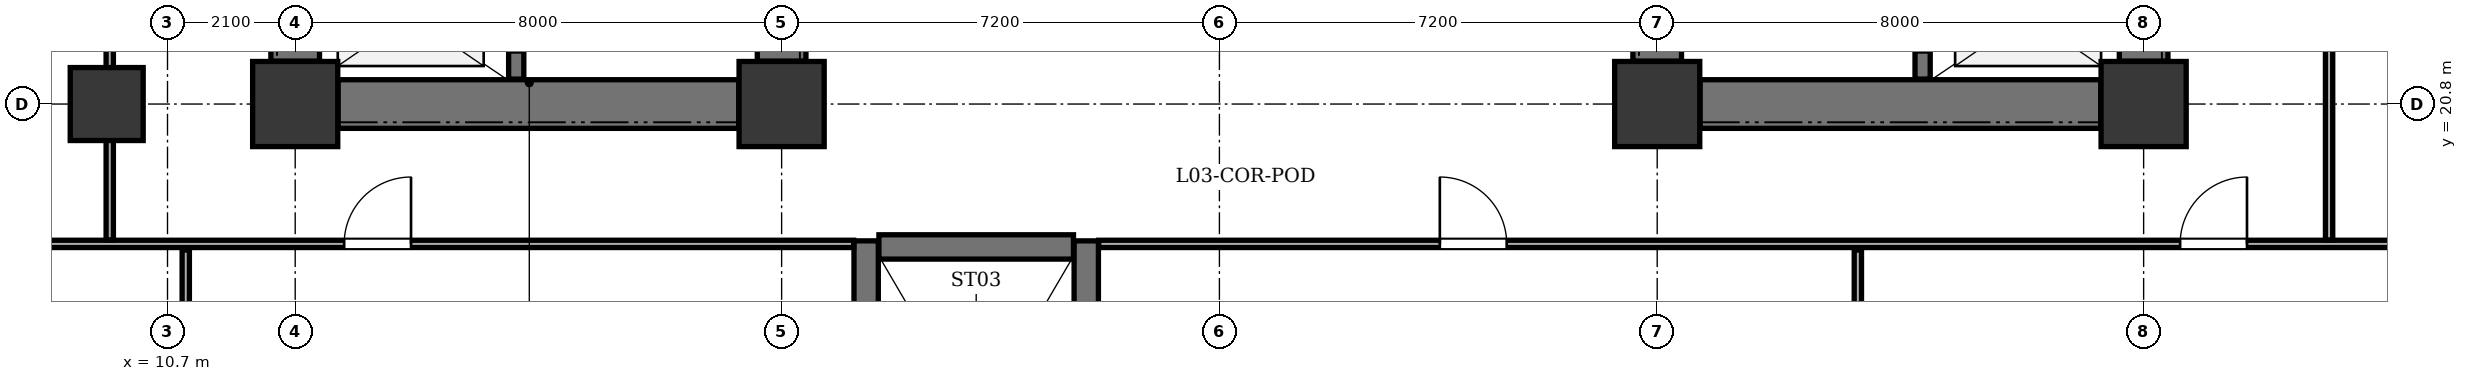
"""IFC4 building model, lengths in metres.
Left out: names, types, materials, properties, quantities, classifications, styles, units other than length and angle.
Written with IfcOpenShell. Run it as: python <this file> out.ifc"""

import sys

from ifc_helpers import new_model, si_unit, direction, frame, frame_2d, origin, origin_2d, place, context, subcontext, project, spatial, rectangle, extrude, element, fill, save


model = new_model("IFC4")
c1 = context("Model", 3, precision=1e-05, world=origin(), true_north=direction((0.0, 1.0)))
c2 = subcontext(c1, "Body", "Model", "MODEL_VIEW")
j1 = project(units=[si_unit("LENGTHUNIT", "METRE"), si_unit("PLANEANGLEUNIT", "RADIAN")], contexts=[c1])
p1 = place(None, origin())
s1 = spatial("IfcSite", under=j1, at=p1, CompositionType="ELEMENT")
p2 = place(p1, origin())
s2 = spatial("IfcBuilding", under=s1, at=p2, CompositionType="ELEMENT")
p3 = place(p2, frame((0.0, 0.0, 14.4)))
s3 = spatial("IfcBuildingStorey", under=s2, at=p3, CompositionType="ELEMENT", Elevation=14.4)
for number, where, z_axis, x_axis in (
    (1, (12.8, 20.8, 0.0), (0.0, 0.0, 1.0), (1.0, 0.0, 0.0)),
    (2, (20.8, 20.8, 0.0), (0.0, 0.0, 1.0), (1.0, 0.0, 0.0)),
    (3, (35.2, 20.8, 0.0), (0.0, 0.0, 1.0), (1.0, 0.0, 0.0)),
    (4, (43.2, 20.8, 0.0), (0.0, 0.0, 1.0), (1.0, 0.0, 0.0)),
):
    element("IfcColumn", number, at=place(p3, frame(where, z_axis=z_axis, x_axis=x_axis)), inside=s3, PredefinedType="COLUMN", context=c2, shape_type="SweptSolid", body=[
        extrude(rectangle(XDim=1.4, YDim=1.4, at=origin_2d()), origin(), (0.0, 0.0, 1.0), 4.5),
    ])
p4 = place(p3, frame((9.7, 20.8, 0.0), z_axis=(0.0, 0.0, 1.0), x_axis=(1.0, 0.0, 0.0)))
e5 = element("IfcColumn", 5, at=p4, inside=s3, PredefinedType="COLUMN", context=c2, shape_type="SweptSolid", body=[
    extrude(rectangle(XDim=1.2, YDim=1.2, at=origin_2d()), origin(), (0.0, 0.0, 1.0), 4.5),
])
p5 = place(p3, frame((12.8, 21.505, 0.0), z_axis=(0.0, 0.0, 1.0), x_axis=(0.0, 1.0, 0.0)))
e6 = element("IfcWall", 6, at=p5, inside=s3, PredefinedType="SHEAR", context=c2, shape_type="SweptSolid", body=[
    extrude(rectangle(XDim=11.39, YDim=0.8, at=frame_2d((5.695, 0.0))), origin(), (0.0, 0.0, 1.0), 4.0),
])
p6 = place(p3, frame((13.505, 20.8, 0.0), z_axis=(0.0, 0.0, 1.0), x_axis=(1.0, 0.0, 0.0)))
e7 = element("IfcWall", 7, at=p6, inside=s3, PredefinedType="SHEAR", context=c2, shape_type="SweptSolid", body=[
    extrude(rectangle(XDim=6.59, YDim=0.8, at=frame_2d((3.295, 0.0))), origin(), (0.0, 0.0, 1.0), 4.0),
])
p7 = place(p3, frame((20.8, 21.505, 0.0), z_axis=(0.0, 0.0, 1.0), x_axis=(0.0, 1.0, 0.0)))
e8 = element("IfcWall", 8, at=p7, inside=s3, PredefinedType="SHEAR", context=c2, shape_type="SweptSolid", body=[
    extrude(rectangle(XDim=11.39, YDim=0.8, at=frame_2d((5.695, 0.0))), origin(), (0.0, 0.0, 1.0), 4.0),
])
p8 = place(p7, frame((1.095, 0.0, 0.0)))
e9 = element("IfcOpeningElement", 9, at=p8, cuts=e8, PredefinedType="OPENING", context=c2, shape_type="SweptSolid", body=[
    extrude(rectangle(XDim=1.2, YDim=2.15, at=frame_2d((0.6, 1.075))), frame((0.0, 0.41, 0.0), z_axis=(0.0, -1.0, 0.0), x_axis=(1.0, 0.0, 0.0)), (0.0, 0.0, 1.0), 0.82),
])
p9 = place(p7, frame((4.095, 0.0, 0.0)))
e10 = element("IfcOpeningElement", 10, at=p9, cuts=e8, PredefinedType="OPENING", context=c2, shape_type="SweptSolid", body=[
    extrude(rectangle(XDim=1.1, YDim=2.1, at=frame_2d((0.55, 1.05))), frame((0.0, 0.41, 0.0), z_axis=(0.0, -1.0, 0.0), x_axis=(1.0, 0.0, 0.0)), (0.0, 0.0, 1.0), 0.82),
])
p10 = place(p7, frame((6.045, 0.0, 0.0)))
e11 = element("IfcOpeningElement", 11, at=p10, cuts=e8, PredefinedType="OPENING", context=c2, shape_type="SweptSolid", body=[
    extrude(rectangle(XDim=1.1, YDim=2.1, at=frame_2d((0.55, 1.05))), frame((0.0, 0.41, 0.0), z_axis=(0.0, -1.0, 0.0), x_axis=(1.0, 0.0, 0.0)), (0.0, 0.0, 1.0), 0.82),
])
p11 = place(p7, frame((7.995, 0.0, 0.0)))
e12 = element("IfcOpeningElement", 12, at=p11, cuts=e8, PredefinedType="OPENING", context=c2, shape_type="SweptSolid", body=[
    extrude(rectangle(XDim=1.1, YDim=2.1, at=frame_2d((0.55, 1.05))), frame((0.0, 0.41, 0.0), z_axis=(0.0, -1.0, 0.0), x_axis=(1.0, 0.0, 0.0)), (0.0, 0.0, 1.0), 0.82),
])
p12 = place(p7, frame((10.195, 0.0, 0.0)))
e13 = element("IfcOpeningElement", 13, at=p12, cuts=e8, PredefinedType="OPENING", context=c2, shape_type="SweptSolid", body=[
    extrude(rectangle(XDim=1.1, YDim=2.1, at=frame_2d((0.55, 1.05))), frame((0.0, 0.41, 0.0), z_axis=(0.0, -1.0, 0.0), x_axis=(1.0, 0.0, 0.0)), (0.0, 0.0, 1.0), 0.82),
])
p13 = place(p3, frame((16.435, 21.21, 0.0), z_axis=(0.0, 0.0, 1.0), x_axis=(0.0, 1.0, 0.0)))
e14 = element("IfcWall", 14, at=p13, inside=s3, PredefinedType="SHEAR", context=c2, shape_type="SweptSolid", body=[
    extrude(rectangle(XDim=11.98, YDim=0.25, at=frame_2d((5.99, 0.0))), origin(), (0.0, 0.0, 1.0), 4.0),
])
p14 = place(p13, frame((0.44, 0.0, 0.0)))
e15 = element("IfcOpeningElement", 15, at=p14, cuts=e14, PredefinedType="OPENING", context=c2, shape_type="SweptSolid", body=[
    extrude(rectangle(XDim=1.2, YDim=2.15, at=frame_2d((0.6, 1.075))), frame((0.0, 0.135, 0.0), z_axis=(0.0, -1.0, 0.0), x_axis=(1.0, 0.0, 0.0)), (0.0, 0.0, 1.0), 0.27),
])
p15 = place(p13, frame((2.59, 0.0, 0.0)))
e16 = element("IfcOpeningElement", 16, at=p15, cuts=e14, PredefinedType="OPENING", context=c2, shape_type="SweptSolid", body=[
    extrude(rectangle(XDim=1.15, YDim=2.15, at=frame_2d((0.575, 1.075))), frame((0.0, 0.135, 0.0), z_axis=(0.0, -1.0, 0.0), x_axis=(1.0, 0.0, 0.0)), (0.0, 0.0, 1.0), 0.27),
])
p16 = place(p3, frame((43.2, 21.505, 0.0), z_axis=(0.0, 0.0, 1.0), x_axis=(0.0, 1.0, 0.0)))
e17 = element("IfcWall", 17, at=p16, inside=s3, PredefinedType="SHEAR", context=c2, shape_type="SweptSolid", body=[
    extrude(rectangle(XDim=11.39, YDim=0.8, at=frame_2d((5.695, 0.0))), origin(), (0.0, 0.0, 1.0), 4.0),
])
p17 = place(p3, frame((35.905, 20.8, 0.0), z_axis=(0.0, 0.0, 1.0), x_axis=(1.0, 0.0, 0.0)))
e18 = element("IfcWall", 18, at=p17, inside=s3, PredefinedType="SHEAR", context=c2, shape_type="SweptSolid", body=[
    extrude(rectangle(XDim=6.59, YDim=0.8, at=frame_2d((3.295, 0.0))), origin(), (0.0, 0.0, 1.0), 4.0),
])
p18 = place(p3, frame((35.2, 21.505, 0.0), z_axis=(0.0, 0.0, 1.0), x_axis=(0.0, 1.0, 0.0)))
e19 = element("IfcWall", 19, at=p18, inside=s3, PredefinedType="SHEAR", context=c2, shape_type="SweptSolid", body=[
    extrude(rectangle(XDim=11.39, YDim=0.8, at=frame_2d((5.695, 0.0))), origin(), (0.0, 0.0, 1.0), 4.0),
])
p19 = place(p18, frame((1.095, 0.0, 0.0)))
e20 = element("IfcOpeningElement", 20, at=p19, cuts=e19, PredefinedType="OPENING", context=c2, shape_type="SweptSolid", body=[
    extrude(rectangle(XDim=1.2, YDim=2.15, at=frame_2d((0.6, 1.075))), frame((0.0, 0.41, 0.0), z_axis=(0.0, -1.0, 0.0), x_axis=(1.0, 0.0, 0.0)), (0.0, 0.0, 1.0), 0.82),
])
p20 = place(p18, frame((10.195, 0.0, 0.0)))
e21 = element("IfcOpeningElement", 21, at=p20, cuts=e19, PredefinedType="OPENING", context=c2, shape_type="SweptSolid", body=[
    extrude(rectangle(XDim=1.1, YDim=2.1, at=frame_2d((0.55, 1.05))), frame((0.0, 0.41, 0.0), z_axis=(0.0, -1.0, 0.0), x_axis=(1.0, 0.0, 0.0)), (0.0, 0.0, 1.0), 0.82),
])
p21 = place(p3, frame((39.565, 21.21, 0.0), z_axis=(0.0, 0.0, 1.0), x_axis=(0.0, 1.0, 0.0)))
e22 = element("IfcWall", 22, at=p21, inside=s3, PredefinedType="SHEAR", context=c2, shape_type="SweptSolid", body=[
    extrude(rectangle(XDim=11.98, YDim=0.25, at=frame_2d((5.99, 0.0))), origin(), (0.0, 0.0, 1.0), 4.0),
])
p22 = place(p21, frame((0.44, 0.0, 0.0)))
e23 = element("IfcOpeningElement", 23, at=p22, cuts=e22, PredefinedType="OPENING", context=c2, shape_type="SweptSolid", body=[
    extrude(rectangle(XDim=1.2, YDim=2.15, at=frame_2d((0.6, 1.075))), frame((0.0, 0.135, 0.0), z_axis=(0.0, -1.0, 0.0), x_axis=(1.0, 0.0, 0.0)), (0.0, 0.0, 1.0), 0.27),
])
p23 = place(p21, frame((2.59, 0.0, 0.0)))
e24 = element("IfcOpeningElement", 24, at=p23, cuts=e22, PredefinedType="OPENING", context=c2, shape_type="SweptSolid", body=[
    extrude(rectangle(XDim=1.15, YDim=2.15, at=frame_2d((0.575, 1.075))), frame((0.0, 0.135, 0.0), z_axis=(0.0, -1.0, 0.0), x_axis=(1.0, 0.0, 0.0)), (0.0, 0.0, 1.0), 0.27),
])
p24 = place(p3, frame((22.19, 10.95, 0.0), z_axis=(0.0, 0.0, 1.0), x_axis=(0.0, 1.0, 0.0)))
e25 = element("IfcWall", 25, at=p24, inside=s3, PredefinedType="SHEAR", context=c2, shape_type="SweptSolid", body=[
    extrude(rectangle(XDim=7.6, YDim=0.4, at=frame_2d((3.8, 0.0))), origin(), (0.0, 0.0, 1.0), 4.0),
])
p25 = place(p24, frame((0.35, 0.0, 0.0)))
e26 = element("IfcOpeningElement", 26, at=p25, cuts=e25, PredefinedType="OPENING", context=c2, shape_type="SweptSolid", body=[
    extrude(rectangle(XDim=1.15, YDim=2.15, at=frame_2d((0.575, 1.075))), frame((0.0, 0.21, 0.0), z_axis=(0.0, -1.0, 0.0), x_axis=(1.0, 0.0, 0.0)), (0.0, 0.0, 1.0), 0.42),
])
p26 = place(p3, frame((25.81, 10.95, 0.0), z_axis=(0.0, 0.0, 1.0), x_axis=(0.0, 1.0, 0.0)))
e27 = element("IfcWall", 27, at=p26, inside=s3, PredefinedType="SHEAR", context=c2, shape_type="SweptSolid", body=[
    extrude(rectangle(XDim=7.6, YDim=0.4, at=frame_2d((3.8, 0.0))), origin(), (0.0, 0.0, 1.0), 4.0),
])
p27 = place(p3, frame((22.4, 18.45, 0.0), z_axis=(0.0, 0.0, 1.0), x_axis=(1.0, 0.0, 0.0)))
e28 = element("IfcWall", 28, at=p27, inside=s3, PredefinedType="SHEAR", context=c2, shape_type="SweptSolid", body=[
    extrude(rectangle(XDim=3.2, YDim=0.4, at=frame_2d((1.6, 0.0))), origin(), (0.0, 0.0, 1.0), 4.0),
])
p28 = place(p3, frame((2.805, 18.5, 0.0), z_axis=(0.0, 0.0, 1.0), x_axis=(1.0, 0.0, 0.0)))
e29 = element("IfcWall", 29, at=p28, inside=s3, PredefinedType="PARTITIONING", context=c2, shape_type="SweptSolid", body=[
    extrude(rectangle(XDim=19.18, YDim=0.12, at=frame_2d((9.59, 0.0))), origin(), (0.0, 0.0, 1.0), 3.435),
])
p29 = place(p28, frame((4.0, 0.0, 0.0)))
e30 = element("IfcOpeningElement", 30, at=p29, cuts=e29, PredefinedType="OPENING", context=c2, shape_type="SweptSolid", body=[
    extrude(rectangle(XDim=1.1, YDim=2.15, at=frame_2d((0.55, 1.075))), frame((0.0, 0.07, 0.0), z_axis=(0.0, -1.0, 0.0), x_axis=(1.0, 0.0, 0.0)), (0.0, 0.0, 1.0), 0.14),
])
p30 = place(p28, frame((10.8, 0.0, 0.0)))
e31 = element("IfcOpeningElement", 31, at=p30, cuts=e29, PredefinedType="OPENING", context=c2, shape_type="SweptSolid", body=[
    extrude(rectangle(XDim=1.1, YDim=2.15, at=frame_2d((0.55, 1.075))), frame((0.0, 0.07, 0.0), z_axis=(0.0, -1.0, 0.0), x_axis=(1.0, 0.0, 0.0)), (0.0, 0.0, 1.0), 0.14),
])
p31 = place(p3, frame((26.015, 18.5, 0.0), z_axis=(0.0, 0.0, 1.0), x_axis=(1.0, 0.0, 0.0)))
e32 = element("IfcWall", 32, at=p31, inside=s3, PredefinedType="PARTITIONING", context=c2, shape_type="SweptSolid", body=[
    extrude(rectangle(XDim=31.58, YDim=0.12, at=frame_2d((15.79, 0.0))), origin(), (0.0, 0.0, 1.0), 3.435),
])
p32 = place(p31, frame((5.61, 0.0, 0.0)))
e33 = element("IfcOpeningElement", 33, at=p32, cuts=e32, PredefinedType="OPENING", context=c2, shape_type="SweptSolid", body=[
    extrude(rectangle(XDim=1.1, YDim=2.15, at=frame_2d((0.55, 1.075))), frame((0.0, 0.07, 0.0), z_axis=(0.0, -1.0, 0.0), x_axis=(1.0, 0.0, 0.0)), (0.0, 0.0, 1.0), 0.14),
])
p33 = place(p31, frame((17.785, 0.0, 0.0)))
e34 = element("IfcOpeningElement", 34, at=p33, cuts=e32, PredefinedType="OPENING", context=c2, shape_type="SweptSolid", body=[
    extrude(rectangle(XDim=1.1, YDim=2.15, at=frame_2d((0.55, 1.075))), frame((0.0, 0.07, 0.0), z_axis=(0.0, -1.0, 0.0), x_axis=(1.0, 0.0, 0.0)), (0.0, 0.0, 1.0), 0.14),
])
p34 = place(p31, frame((25.935, 0.0, 0.0)))
e35 = element("IfcOpeningElement", 35, at=p34, cuts=e32, PredefinedType="OPENING", context=c2, shape_type="SweptSolid", body=[
    extrude(rectangle(XDim=1.1, YDim=2.15, at=frame_2d((0.55, 1.075))), frame((0.0, 0.07, 0.0), z_axis=(0.0, -1.0, 0.0), x_axis=(1.0, 0.0, 0.0)), (0.0, 0.0, 1.0), 0.14),
])
p35 = place(p3, frame((11.0, 1.905, 0.0), z_axis=(0.0, 0.0, 1.0), x_axis=(0.0, 1.0, 0.0)))
e36 = element("IfcWall", 36, at=p35, inside=s3, PredefinedType="PARTITIONING", context=c2, shape_type="SweptSolid", body=[
    extrude(rectangle(XDim=16.495, YDim=0.12, at=frame_2d((8.248, 0.0))), origin(), (0.0, 0.0, 1.0), 4.0),
])
p36 = place(p3, frame((38.5, 1.825, 0.0), z_axis=(0.0, 0.0, 1.0), x_axis=(0.0, 1.0, 0.0)))
e37 = element("IfcWall", 37, at=p36, inside=s3, PredefinedType="PARTITIONING", context=c2, shape_type="SweptSolid", body=[
    extrude(rectangle(XDim=16.575, YDim=0.12, at=frame_2d((8.288, 0.0))), origin(), (0.0, 0.0, 1.0), 4.0),
])
p37 = place(p3, frame((9.75, 18.565, 0.0), z_axis=(0.0, 0.0, 1.0), x_axis=(0.0, 1.0, 0.0)))
e38 = element("IfcWall", 38, at=p37, inside=s3, PredefinedType="PARTITIONING", context=c2, shape_type="SweptSolid", body=[
    extrude(rectangle(XDim=19.72, YDim=0.12, at=frame_2d((9.86, 0.0))), origin(), (0.0, 0.0, 1.0), 2.185),
])
p38 = place(p37, frame((7.985, 0.0, 0.0)))
e39 = element("IfcOpeningElement", 39, at=p38, cuts=e38, PredefinedType="OPENING", context=c2, shape_type="SweptSolid", body=[
    extrude(rectangle(XDim=1.0, YDim=2.1, at=frame_2d((0.5, 1.05))), frame((0.0, 0.07, 0.0), z_axis=(0.0, -1.0, 0.0), x_axis=(1.0, 0.0, 0.0)), (0.0, 0.0, 1.0), 0.14),
])
p39 = place(p3, frame((46.25, 18.565, 0.0), z_axis=(0.0, 0.0, 1.0), x_axis=(0.0, 1.0, 0.0)))
e40 = element("IfcWall", 40, at=p39, inside=s3, PredefinedType="PARTITIONING", context=c2, shape_type="SweptSolid", body=[
    extrude(rectangle(XDim=19.72, YDim=0.12, at=frame_2d((9.86, 0.0))), origin(), (0.0, 0.0, 1.0), 4.0),
])
p40 = place(p39, frame((7.985, 0.0, 0.0)))
e41 = element("IfcOpeningElement", 41, at=p40, cuts=e40, PredefinedType="OPENING", context=c2, shape_type="SweptSolid", body=[
    extrude(rectangle(XDim=1.0, YDim=2.1, at=frame_2d((0.5, 1.05))), frame((0.0, 0.07, 0.0), z_axis=(0.0, -1.0, 0.0), x_axis=(1.0, 0.0, 0.0)), (0.0, 0.0, 1.0), 0.14),
])
p41 = place(p30, origin())
e42 = element("IfcDoor", 42, at=p41, inside=s3, OperationType="SINGLE_SWING_RIGHT", PredefinedType="DOOR", context=c2, shape_type="SweptSolid", body=[
    extrude(rectangle(XDim=1.1, YDim=2.15, at=frame_2d((0.55, 1.075))), frame((0.0, 0.025, 0.0), z_axis=(0.0, -1.0, 0.0), x_axis=(1.0, 0.0, 0.0)), (0.0, 0.0, 1.0), 0.05),
])
fill(e31, e42)
p42 = place(p32, origin())
e43 = element("IfcDoor", 43, at=p42, inside=s3, OperationType="SINGLE_SWING_LEFT", PredefinedType="DOOR", context=c2, shape_type="SweptSolid", body=[
    extrude(rectangle(XDim=1.1, YDim=2.15, at=frame_2d((0.55, 1.075))), frame((0.0, 0.025, 0.0), z_axis=(0.0, -1.0, 0.0), x_axis=(1.0, 0.0, 0.0)), (0.0, 0.0, 1.0), 0.05),
])
fill(e33, e43)
p43 = place(p33, origin())
e44 = element("IfcDoor", 44, at=p43, inside=s3, OperationType="SINGLE_SWING_RIGHT", PredefinedType="DOOR", context=c2, shape_type="SweptSolid", body=[
    extrude(rectangle(XDim=1.1, YDim=2.15, at=frame_2d((0.55, 1.075))), frame((0.0, 0.025, 0.0), z_axis=(0.0, -1.0, 0.0), x_axis=(1.0, 0.0, 0.0)), (0.0, 0.0, 1.0), 0.05),
])
fill(e34, e44)
save(model, sys.argv[1])
